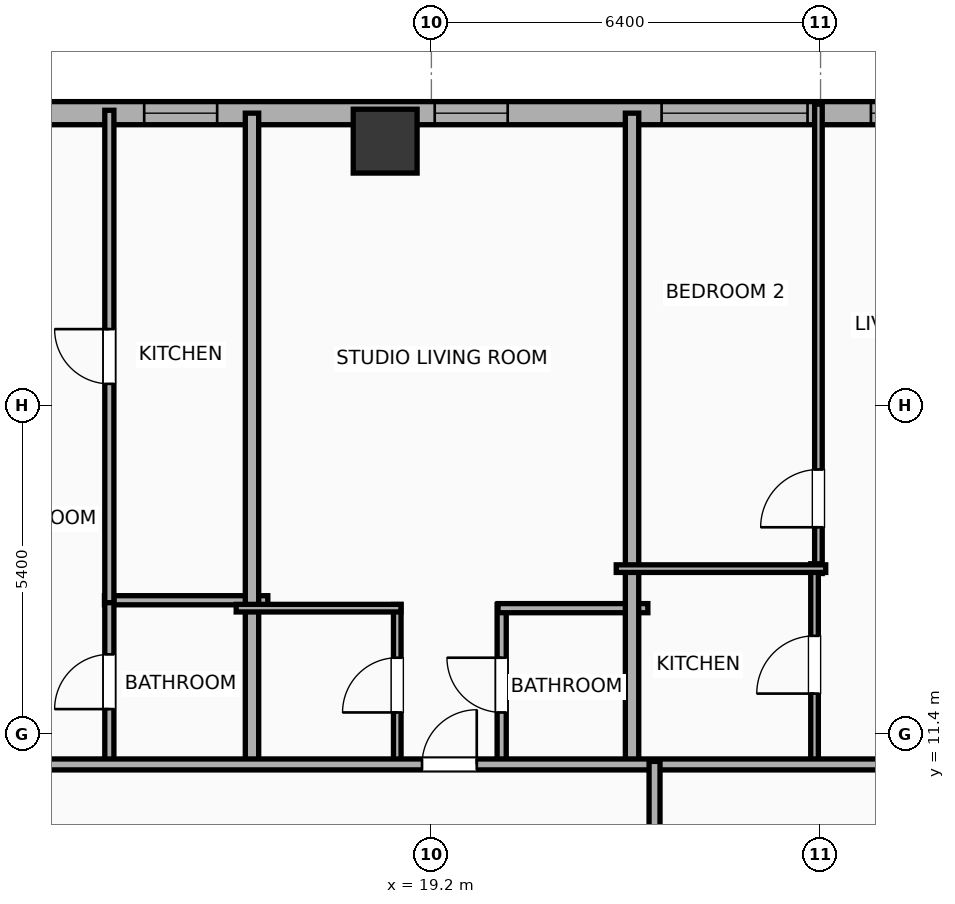
"""IFC4 building model, lengths in metres.
Left out: names, types, materials, properties, quantities, classifications, styles, units other than length and angle.
Written with IfcOpenShell. Run it as: python <this file> out.ifc"""

import sys

from ifc_helpers import new_model, si_unit, direction, frame, frame_2d, origin, origin_2d, place, context, subcontext, project, spatial, rectangle, hollow_rectangle, extrude, element, fill, save


model = new_model("IFC4")
c1 = context("Model", 3, precision=1e-05, world=origin(), true_north=direction((0.0, 1.0)))
c2 = subcontext(c1, "Body", "Model", "MODEL_VIEW")
j1 = project(units=[si_unit("LENGTHUNIT", "METRE"), si_unit("PLANEANGLEUNIT", "RADIAN")], contexts=[c1])
p1 = place(None, origin())
s1 = spatial("IfcSite", under=j1, at=p1, CompositionType="ELEMENT")
p2 = place(p1, origin())
s2 = spatial("IfcBuilding", under=s1, at=p2, CompositionType="ELEMENT")
p3 = place(p2, frame((0.0, 0.0, 89.7)))
s3 = spatial("IfcBuildingStorey", under=s2, at=p3, CompositionType="ELEMENT", Elevation=89.7)
p4 = place(p3, frame((18.44, 21.15, 0.0), z_axis=(0.0, 0.0, 1.0), x_axis=(1.0, 0.0, 0.0)))
e1 = element("IfcColumn", 1, at=p4, inside=s3, PredefinedType="COLUMN", context=c2, shape_type="SweptSolid", body=[
    extrude(hollow_rectangle(XDim=1.05, YDim=1.05, WallThickness=0.036, at=origin_2d()), origin(), (0.0, 0.0, 1.0), 3.9),
])
p5 = place(p3, frame((-25.381, 21.61, 0.0), z_axis=(0.0, 0.0, 1.0), x_axis=(1.0, 0.0, 0.0)))
e2 = element("IfcWall", 2, at=p5, inside=s3, PredefinedType="ELEMENTEDWALL", context=c2, shape_type="SweptSolid", body=[
    extrude(rectangle(XDim=54.763, YDim=0.38, at=frame_2d((27.381, 0.0))), origin(), (0.0, 0.0, 1.0), 2.54),
])
p6 = place(p5, frame((6.495, 0.0, 0.75)))
e3 = element("IfcOpeningElement", 3, at=p6, cuts=e2, PredefinedType="OPENING", context=c2, shape_type="SweptSolid", body=[
    extrude(rectangle(XDim=2.4, YDim=1.63, at=frame_2d((1.2, 0.815))), frame((0.0, 0.2, 0.0), z_axis=(0.0, -1.0, 0.0), x_axis=(1.0, 0.0, 0.0)), (0.0, 0.0, 1.0), 0.4),
])
p7 = place(p5, frame((48.367, 0.0, 0.75)))
e4 = element("IfcOpeningElement", 4, at=p7, cuts=e2, PredefinedType="OPENING", context=c2, shape_type="SweptSolid", body=[
    extrude(rectangle(XDim=2.4, YDim=1.63, at=frame_2d((1.2, 0.815))), frame((0.0, 0.2, 0.0), z_axis=(0.0, -1.0, 0.0), x_axis=(1.0, 0.0, 0.0)), (0.0, 0.0, 1.0), 0.4),
])
p8 = place(p5, frame((1.231, 0.0, 0.75)))
e5 = element("IfcOpeningElement", 5, at=p8, cuts=e2, PredefinedType="OPENING", context=c2, shape_type="SweptSolid", body=[
    extrude(rectangle(XDim=1.2, YDim=1.63, at=frame_2d((0.6, 0.815))), frame((0.0, 0.2, 0.0), z_axis=(0.0, -1.0, 0.0), x_axis=(1.0, 0.0, 0.0)), (0.0, 0.0, 1.0), 0.4),
])
p9 = place(p5, frame((3.772, 0.0, 0.75)))
e6 = element("IfcOpeningElement", 6, at=p9, cuts=e2, PredefinedType="OPENING", context=c2, shape_type="SweptSolid", body=[
    extrude(rectangle(XDim=1.2, YDim=1.63, at=frame_2d((0.6, 0.815))), frame((0.0, 0.2, 0.0), z_axis=(0.0, -1.0, 0.0), x_axis=(1.0, 0.0, 0.0)), (0.0, 0.0, 1.0), 0.4),
])
p10 = place(p5, frame((12.031, 0.0, 0.75)))
e7 = element("IfcOpeningElement", 7, at=p10, cuts=e2, PredefinedType="OPENING", context=c2, shape_type="SweptSolid", body=[
    extrude(rectangle(XDim=1.2, YDim=1.63, at=frame_2d((0.6, 0.815))), frame((0.0, 0.2, 0.0), z_axis=(0.0, -1.0, 0.0), x_axis=(1.0, 0.0, 0.0)), (0.0, 0.0, 1.0), 0.4),
])
p11 = place(p5, frame((19.805, 0.0, 0.75)))
e8 = element("IfcOpeningElement", 8, at=p11, cuts=e2, PredefinedType="OPENING", context=c2, shape_type="SweptSolid", body=[
    extrude(rectangle(XDim=1.2, YDim=1.63, at=frame_2d((0.6, 0.815))), frame((0.0, 0.2, 0.0), z_axis=(0.0, -1.0, 0.0), x_axis=(1.0, 0.0, 0.0)), (0.0, 0.0, 1.0), 0.4),
])
p12 = place(p5, frame((16.555, 0.0, 0.75)))
e9 = element("IfcOpeningElement", 9, at=p12, cuts=e2, PredefinedType="OPENING", context=c2, shape_type="SweptSolid", body=[
    extrude(rectangle(XDim=1.2, YDim=1.63, at=frame_2d((0.6, 0.815))), frame((0.0, 0.2, 0.0), z_axis=(0.0, -1.0, 0.0), x_axis=(1.0, 0.0, 0.0)), (0.0, 0.0, 1.0), 0.4),
])
p13 = place(p5, frame((23.866, 0.0, 0.75)))
e10 = element("IfcOpeningElement", 10, at=p13, cuts=e2, PredefinedType="OPENING", context=c2, shape_type="SweptSolid", body=[
    extrude(rectangle(XDim=1.2, YDim=1.63, at=frame_2d((0.6, 0.815))), frame((0.0, 0.2, 0.0), z_axis=(0.0, -1.0, 0.0), x_axis=(1.0, 0.0, 0.0)), (0.0, 0.0, 1.0), 0.4),
])
p14 = place(p5, frame((27.116, 0.0, 0.75)))
e11 = element("IfcOpeningElement", 11, at=p14, cuts=e2, PredefinedType="OPENING", context=c2, shape_type="SweptSolid", body=[
    extrude(rectangle(XDim=1.2, YDim=1.63, at=frame_2d((0.6, 0.815))), frame((0.0, 0.2, 0.0), z_axis=(0.0, -1.0, 0.0), x_axis=(1.0, 0.0, 0.0)), (0.0, 0.0, 1.0), 0.4),
])
p15 = place(p5, frame((30.931, 0.0, 0.75)))
e12 = element("IfcOpeningElement", 12, at=p15, cuts=e2, PredefinedType="OPENING", context=c2, shape_type="SweptSolid", body=[
    extrude(rectangle(XDim=1.2, YDim=1.63, at=frame_2d((0.6, 0.815))), frame((0.0, 0.2, 0.0), z_axis=(0.0, -1.0, 0.0), x_axis=(1.0, 0.0, 0.0)), (0.0, 0.0, 1.0), 0.4),
])
p16 = place(p5, frame((36.733, 0.0, 0.75)))
e13 = element("IfcOpeningElement", 13, at=p16, cuts=e2, PredefinedType="OPENING", context=c2, shape_type="SweptSolid", body=[
    extrude(rectangle(XDim=1.2, YDim=1.63, at=frame_2d((0.6, 0.815))), frame((0.0, 0.2, 0.0), z_axis=(0.0, -1.0, 0.0), x_axis=(1.0, 0.0, 0.0)), (0.0, 0.0, 1.0), 0.4),
])
p17 = place(p5, frame((39.858, 0.0, 0.75)))
e14 = element("IfcOpeningElement", 14, at=p17, cuts=e2, PredefinedType="OPENING", context=c2, shape_type="SweptSolid", body=[
    extrude(rectangle(XDim=1.2, YDim=1.63, at=frame_2d((0.6, 0.815))), frame((0.0, 0.2, 0.0), z_axis=(0.0, -1.0, 0.0), x_axis=(1.0, 0.0, 0.0)), (0.0, 0.0, 1.0), 0.4),
])
p18 = place(p5, frame((44.636, 0.0, 0.75)))
e15 = element("IfcOpeningElement", 15, at=p18, cuts=e2, PredefinedType="OPENING", context=c2, shape_type="SweptSolid", body=[
    extrude(rectangle(XDim=1.2, YDim=1.63, at=frame_2d((0.6, 0.815))), frame((0.0, 0.2, 0.0), z_axis=(0.0, -1.0, 0.0), x_axis=(1.0, 0.0, 0.0)), (0.0, 0.0, 1.0), 0.4),
])
p19 = place(p5, frame((51.809, 0.0, 0.75)))
e16 = element("IfcOpeningElement", 16, at=p19, cuts=e2, PredefinedType="OPENING", context=c2, shape_type="SweptSolid", body=[
    extrude(rectangle(XDim=1.2, YDim=1.63, at=frame_2d((0.6, 0.815))), frame((0.0, 0.2, 0.0), z_axis=(0.0, -1.0, 0.0), x_axis=(1.0, 0.0, 0.0)), (0.0, 0.0, 1.0), 0.4),
])
p20 = place(p3, frame((13.824, 13.6, 0.0), z_axis=(0.0, 0.0, 1.0), x_axis=(1.0, 0.0, 0.0)))
e17 = element("IfcWall", 17, at=p20, inside=s3, PredefinedType="PLUMBINGWALL", context=c2, shape_type="SweptSolid", body=[
    extrude(rectangle(XDim=2.686, YDim=0.15, at=frame_2d((1.343, 0.0))), origin(), (0.0, 0.0, 1.0), 3.65),
])
p21 = place(p3, frame((13.904, 10.88, 0.0), z_axis=(0.0, 0.0, 1.0), x_axis=(0.0, 1.0, 0.0)))
e18 = element("IfcWall", 18, at=p21, inside=s3, PredefinedType="PLUMBINGWALL", context=c2, shape_type="SweptSolid", body=[
    extrude(rectangle(XDim=2.76, YDim=0.15, at=frame_2d((1.38, 0.0))), origin(), (0.0, 0.0, 1.0), 3.65),
])
p22 = place(p21, frame((0.93, 0.0, 0.0)))
e19 = element("IfcOpeningElement", 19, at=p22, cuts=e18, PredefinedType="OPENING", context=c2, shape_type="SweptSolid", body=[
    extrude(rectangle(XDim=0.9, YDim=2.05, at=frame_2d((0.45, 1.025))), frame((0.0, 0.085, 0.0), z_axis=(0.0, -1.0, 0.0), x_axis=(1.0, 0.0, 0.0)), (0.0, 0.0, 1.0), 0.17),
])
p23 = place(p3, frame((13.904, 13.56, 0.0), z_axis=(0.0, 0.0, 1.0), x_axis=(0.0, 1.0, 0.0)))
e20 = element("IfcWall", 20, at=p23, inside=s3, PredefinedType="PLUMBINGWALL", context=c2, shape_type="SweptSolid", body=[
    extrude(rectangle(XDim=8.098, YDim=0.15, at=frame_2d((4.049, 0.0))), origin(), (0.0, 0.0, 1.0), 3.65),
])
p24 = place(p23, frame((3.599, 0.0, 0.0)))
e21 = element("IfcOpeningElement", 21, at=p24, cuts=e20, PredefinedType="OPENING", context=c2, shape_type="SweptSolid", body=[
    extrude(rectangle(XDim=0.9, YDim=2.05, at=frame_2d((0.45, 1.025))), frame((0.0, 0.085, 0.0), z_axis=(0.0, -1.0, 0.0), x_axis=(1.0, 0.0, 0.0)), (0.0, 0.0, 1.0), 0.17),
])
p25 = place(p3, frame((16.25, 10.82, 0.0), z_axis=(0.0, 0.0, 1.0), x_axis=(0.0, 1.0, 0.0)))
e22 = element("IfcWall", 22, at=p25, inside=s3, PredefinedType="PARTITIONING", context=c2, shape_type="SweptSolid", body=[
    extrude(rectangle(XDim=10.79, YDim=0.22, at=frame_2d((5.395, 0.0))), origin(), (0.0, 0.0, 1.0), 3.65),
])
p26 = place(p3, frame((18.639, 10.88, 0.0), z_axis=(0.0, 0.0, 1.0), x_axis=(0.0, 1.0, 0.0)))
e23 = element("IfcWall", 23, at=p26, inside=s3, PredefinedType="PARTITIONING", context=c2, shape_type="SweptSolid", body=[
    extrude(rectangle(XDim=2.65, YDim=0.125, at=frame_2d((1.325, 0.0))), origin(), (0.0, 0.0, 1.0), 2.54),
])
p27 = place(p26, frame((0.875, 0.0, 0.0)))
e24 = element("IfcOpeningElement", 24, at=p27, cuts=e23, PredefinedType="OPENING", context=c2, shape_type="SweptSolid", body=[
    extrude(rectangle(XDim=0.9, YDim=2.05, at=frame_2d((0.45, 1.025))), frame((0.0, 0.073, 0.0), z_axis=(0.0, -1.0, 0.0), x_axis=(1.0, 0.0, 0.0)), (0.0, 0.0, 1.0), 0.145),
])
p28 = place(p3, frame((20.356, 10.88, 0.0), z_axis=(0.0, 0.0, 1.0), x_axis=(0.0, 1.0, 0.0)))
e25 = element("IfcWall", 25, at=p28, inside=s3, PredefinedType="PLUMBINGWALL", context=c2, shape_type="SweptSolid", body=[
    extrude(rectangle(XDim=2.65, YDim=0.15, at=frame_2d((1.325, 0.0))), origin(), (0.0, 0.0, 1.0), 3.65),
])
p29 = place(p28, frame((0.875, 0.0, 0.0)))
e26 = element("IfcOpeningElement", 26, at=p29, cuts=e25, PredefinedType="OPENING", context=c2, shape_type="SweptSolid", body=[
    extrude(rectangle(XDim=0.9, YDim=2.05, at=frame_2d((0.45, 1.025))), frame((0.0, 0.085, 0.0), z_axis=(0.0, -1.0, 0.0), x_axis=(1.0, 0.0, 0.0)), (0.0, 0.0, 1.0), 0.17),
])
p30 = place(p3, frame((15.99, 13.47, 0.0), z_axis=(0.0, 0.0, 1.0), x_axis=(1.0, 0.0, 0.0)))
e27 = element("IfcWall", 27, at=p30, inside=s3, PredefinedType="PARTITIONING", context=c2, shape_type="SweptSolid", body=[
    extrude(rectangle(XDim=2.709, YDim=0.125, at=frame_2d((1.354, 0.0))), origin(), (0.0, 0.0, 1.0), 3.65),
])
p31 = place(p3, frame((20.296, 13.47, 0.0), z_axis=(0.0, 0.0, 1.0), x_axis=(1.0, 0.0, 0.0)))
e28 = element("IfcWall", 28, at=p31, inside=s3, PredefinedType="PLUMBINGWALL", context=c2, shape_type="SweptSolid", body=[
    extrude(rectangle(XDim=2.464, YDim=0.15, at=frame_2d((1.232, 0.0))), origin(), (0.0, 0.0, 1.0), 3.65),
])
p32 = place(p3, frame((22.5, 10.82, 0.0), z_axis=(0.0, 0.0, 1.0), x_axis=(0.0, 1.0, 0.0)))
e29 = element("IfcWall", 29, at=p32, inside=s3, PredefinedType="PARTITIONING", context=c2, shape_type="SweptSolid", body=[
    extrude(rectangle(XDim=10.79, YDim=0.22, at=frame_2d((5.395, 0.0))), origin(), (0.0, 0.0, 1.0), 3.65),
])
p33 = place(p3, frame((25.565, 14.04, 0.0), z_axis=(0.0, 0.0, 1.0), x_axis=(0.0, 1.0, 0.0)))
e30 = element("IfcWall", 30, at=p33, inside=s3, PredefinedType="PARTITIONING", context=c2, shape_type="SweptSolid", body=[
    extrude(rectangle(XDim=7.72, YDim=0.125, at=frame_2d((3.86, 0.0))), origin(), (0.0, 0.0, 1.0), 3.65),
])
p34 = place(p33, frame((0.76, 0.0, 0.0)))
e31 = element("IfcOpeningElement", 31, at=p34, cuts=e30, PredefinedType="OPENING", context=c2, shape_type="SweptSolid", body=[
    extrude(rectangle(XDim=0.95, YDim=2.05, at=frame_2d((0.475, 1.025))), frame((0.0, 0.073, 0.0), z_axis=(0.0, -1.0, 0.0), x_axis=(1.0, 0.0, 0.0)), (0.0, 0.0, 1.0), 0.145),
])
p35 = place(p3, frame((25.501, 10.88, 0.0), z_axis=(0.0, 0.0, 1.0), x_axis=(0.0, 1.0, 0.0)))
e32 = element("IfcWall", 32, at=p35, inside=s3, PredefinedType="PARTITIONING", context=c2, shape_type="SweptSolid", body=[
    extrude(rectangle(XDim=3.32, YDim=0.125, at=frame_2d((1.66, 0.0))), origin(), (0.0, 0.0, 1.0), 3.65),
])
p36 = place(p35, frame((1.185, 0.0, 0.0)))
e33 = element("IfcOpeningElement", 33, at=p36, cuts=e32, PredefinedType="OPENING", context=c2, shape_type="SweptSolid", body=[
    extrude(rectangle(XDim=0.95, YDim=2.05, at=frame_2d((0.475, 1.025))), frame((0.0, 0.073, 0.0), z_axis=(0.0, -1.0, 0.0), x_axis=(1.0, 0.0, 0.0)), (0.0, 0.0, 1.0), 0.145),
])
p37 = place(p3, frame((22.24, 14.12, 0.0), z_axis=(0.0, 0.0, 1.0), x_axis=(1.0, 0.0, 0.0)))
e34 = element("IfcWall", 34, at=p37, inside=s3, PredefinedType="PARTITIONING", context=c2, shape_type="SweptSolid", body=[
    extrude(rectangle(XDim=3.445, YDim=0.125, at=frame_2d((1.723, 0.0))), origin(), (0.0, 0.0, 1.0), 3.65),
])
p38 = place(p3, frame((-29.21, 10.9, 0.0), z_axis=(0.0, 0.0, 1.0), x_axis=(1.0, 0.0, 0.0)))
e35 = element("IfcWall", 35, at=p38, inside=s3, PredefinedType="PARTITIONING", context=c2, shape_type="SweptSolid", body=[
    extrude(rectangle(XDim=62.42, YDim=0.18, at=frame_2d((31.21, 0.0))), origin(), (0.0, 0.0, 1.0), 3.65),
])
p39 = place(p38, frame((2.983, 0.0, 0.0)))
e36 = element("IfcOpeningElement", 36, at=p39, cuts=e35, PredefinedType="OPENING", context=c2, shape_type="SweptSolid", body=[
    extrude(rectangle(XDim=0.9, YDim=2.05, at=frame_2d((0.45, 1.025))), frame((0.0, 0.1, 0.0), z_axis=(0.0, -1.0, 0.0), x_axis=(1.0, 0.0, 0.0)), (0.0, 0.0, 1.0), 0.2),
])
p40 = place(p38, frame((9.618, 0.0, 0.0)))
e37 = element("IfcOpeningElement", 37, at=p40, cuts=e35, PredefinedType="OPENING", context=c2, shape_type="SweptSolid", body=[
    extrude(rectangle(XDim=0.9, YDim=2.05, at=frame_2d((0.45, 1.025))), frame((0.0, 0.1, 0.0), z_axis=(0.0, -1.0, 0.0), x_axis=(1.0, 0.0, 0.0)), (0.0, 0.0, 1.0), 0.2),
])
p41 = place(p38, frame((16.135, 0.0, 0.0)))
e38 = element("IfcOpeningElement", 38, at=p41, cuts=e35, PredefinedType="OPENING", context=c2, shape_type="SweptSolid", body=[
    extrude(rectangle(XDim=0.9, YDim=2.05, at=frame_2d((0.45, 1.025))), frame((0.0, 0.1, 0.0), z_axis=(0.0, -1.0, 0.0), x_axis=(1.0, 0.0, 0.0)), (0.0, 0.0, 1.0), 0.2),
])
p42 = place(p38, frame((23.632, 0.0, 0.0)))
e39 = element("IfcOpeningElement", 39, at=p42, cuts=e35, PredefinedType="OPENING", context=c2, shape_type="SweptSolid", body=[
    extrude(rectangle(XDim=1.15, YDim=2.05, at=frame_2d((0.575, 1.025))), frame((0.0, 0.1, 0.0), z_axis=(0.0, -1.0, 0.0), x_axis=(1.0, 0.0, 0.0)), (0.0, 0.0, 1.0), 0.2),
])
p43 = place(p38, frame((27.751, 0.0, 0.0)))
e40 = element("IfcOpeningElement", 40, at=p43, cuts=e35, PredefinedType="OPENING", context=c2, shape_type="SweptSolid", body=[
    extrude(rectangle(XDim=1.15, YDim=2.05, at=frame_2d((0.575, 1.025))), frame((0.0, 0.1, 0.0), z_axis=(0.0, -1.0, 0.0), x_axis=(1.0, 0.0, 0.0)), (0.0, 0.0, 1.0), 0.2),
])
p44 = place(p38, frame((35.635, 0.0, 0.0)))
e41 = element("IfcOpeningElement", 41, at=p44, cuts=e35, PredefinedType="OPENING", context=c2, shape_type="SweptSolid", body=[
    extrude(rectangle(XDim=0.9, YDim=2.05, at=frame_2d((0.45, 1.025))), frame((0.0, 0.1, 0.0), z_axis=(0.0, -1.0, 0.0), x_axis=(1.0, 0.0, 0.0)), (0.0, 0.0, 1.0), 0.2),
])
p45 = place(p38, frame((40.616, 0.0, 0.0)))
e42 = element("IfcOpeningElement", 42, at=p45, cuts=e35, PredefinedType="OPENING", context=c2, shape_type="SweptSolid", body=[
    extrude(rectangle(XDim=1.15, YDim=2.05, at=frame_2d((0.575, 1.025))), frame((0.0, 0.1, 0.0), z_axis=(0.0, -1.0, 0.0), x_axis=(1.0, 0.0, 0.0)), (0.0, 0.0, 1.0), 0.2),
])
p46 = place(p38, frame((48.256, 0.0, 0.0)))
e43 = element("IfcOpeningElement", 43, at=p46, cuts=e35, PredefinedType="OPENING", context=c2, shape_type="SweptSolid", body=[
    extrude(rectangle(XDim=0.9, YDim=2.05, at=frame_2d((0.45, 1.025))), frame((0.0, 0.1, 0.0), z_axis=(0.0, -1.0, 0.0), x_axis=(1.0, 0.0, 0.0)), (0.0, 0.0, 1.0), 0.2),
])
p47 = place(p38, frame((57.032, 0.0, 0.0)))
e44 = element("IfcOpeningElement", 44, at=p47, cuts=e35, PredefinedType="OPENING", context=c2, shape_type="SweptSolid", body=[
    extrude(rectangle(XDim=1.15, YDim=2.05, at=frame_2d((0.575, 1.025))), frame((0.0, 0.1, 0.0), z_axis=(0.0, -1.0, 0.0), x_axis=(1.0, 0.0, 0.0)), (0.0, 0.0, 1.0), 0.2),
])
p48 = place(p3, frame((22.87, -10.95, 0.0), z_axis=(0.0, 0.0, 1.0), x_axis=(0.0, 1.0, 0.0)))
e45 = element("IfcWall", 45, at=p48, inside=s3, PredefinedType="PARTITIONING", context=c2, shape_type="SweptSolid", body=[
    extrude(rectangle(XDim=21.9, YDim=0.18, at=frame_2d((10.95, 0.0))), origin(), (0.0, 0.0, 1.0), 3.65),
])
p49 = place(p48, frame((19.015, 0.0, 0.0)))
e46 = element("IfcOpeningElement", 46, at=p49, cuts=e45, PredefinedType="OPENING", context=c2, shape_type="SweptSolid", body=[
    extrude(rectangle(XDim=0.95, YDim=2.05, at=frame_2d((0.475, 1.025))), frame((0.0, 0.1, 0.0), z_axis=(0.0, -1.0, 0.0), x_axis=(1.0, 0.0, 0.0)), (0.0, 0.0, 1.0), 0.2),
])
p50 = place(p7, origin())
e47 = element("IfcWindow", 47, at=p50, inside=s3, PartitioningType="SINGLE_PANEL", PredefinedType="WINDOW", context=c2, shape_type="SweptSolid", body=[
    extrude(rectangle(XDim=2.4, YDim=1.63, at=frame_2d((1.2, 0.815))), frame((0.0, 0.03, 0.0), z_axis=(0.0, -1.0, 0.0), x_axis=(1.0, 0.0, 0.0)), (0.0, 0.0, 1.0), 0.06),
])
fill(e4, e47)
p51 = place(p17, origin())
e48 = element("IfcWindow", 48, at=p51, inside=s3, PartitioningType="SINGLE_PANEL", PredefinedType="WINDOW", context=c2, shape_type="SweptSolid", body=[
    extrude(rectangle(XDim=1.2, YDim=1.63, at=frame_2d((0.6, 0.815))), frame((0.0, 0.03, 0.0), z_axis=(0.0, -1.0, 0.0), x_axis=(1.0, 0.0, 0.0)), (0.0, 0.0, 1.0), 0.06),
])
fill(e14, e48)
p52 = place(p18, origin())
e49 = element("IfcWindow", 49, at=p52, inside=s3, PartitioningType="SINGLE_PANEL", PredefinedType="WINDOW", context=c2, shape_type="SweptSolid", body=[
    extrude(rectangle(XDim=1.2, YDim=1.63, at=frame_2d((0.6, 0.815))), frame((0.0, 0.03, 0.0), z_axis=(0.0, -1.0, 0.0), x_axis=(1.0, 0.0, 0.0)), (0.0, 0.0, 1.0), 0.06),
])
fill(e15, e49)
p53 = place(p19, origin())
e50 = element("IfcWindow", 50, at=p53, inside=s3, PartitioningType="SINGLE_PANEL", PredefinedType="WINDOW", context=c2, shape_type="SweptSolid", body=[
    extrude(rectangle(XDim=1.2, YDim=1.63, at=frame_2d((0.6, 0.815))), frame((0.0, 0.03, 0.0), z_axis=(0.0, -1.0, 0.0), x_axis=(1.0, 0.0, 0.0)), (0.0, 0.0, 1.0), 0.06),
])
fill(e16, e50)
p54 = place(p22, origin())
e51 = element("IfcDoor", 51, at=p54, inside=s3, OperationType="SINGLE_SWING_LEFT", PredefinedType="DOOR", context=c2, shape_type="SweptSolid", body=[
    extrude(rectangle(XDim=0.9, YDim=2.05, at=frame_2d((0.45, 1.025))), frame((0.0, 0.025, 0.0), z_axis=(0.0, -1.0, 0.0), x_axis=(1.0, 0.0, 0.0)), (0.0, 0.0, 1.0), 0.05),
])
fill(e19, e51)
p55 = place(p24, origin())
e52 = element("IfcDoor", 52, at=p55, inside=s3, OperationType="SINGLE_SWING_RIGHT", PredefinedType="DOOR", context=c2, shape_type="SweptSolid", body=[
    extrude(rectangle(XDim=0.9, YDim=2.05, at=frame_2d((0.45, 1.025))), frame((0.0, 0.025, 0.0), z_axis=(0.0, -1.0, 0.0), x_axis=(1.0, 0.0, 0.0)), (0.0, 0.0, 1.0), 0.05),
])
fill(e21, e52)
p56 = place(p27, origin())
e53 = element("IfcDoor", 53, at=p56, inside=s3, OperationType="SINGLE_SWING_LEFT", PredefinedType="DOOR", context=c2, shape_type="SweptSolid", body=[
    extrude(rectangle(XDim=0.9, YDim=2.05, at=frame_2d((0.45, 1.025))), frame((0.0, 0.025, 0.0), z_axis=(0.0, -1.0, 0.0), x_axis=(1.0, 0.0, 0.0)), (0.0, 0.0, 1.0), 0.05),
])
fill(e24, e53)
p57 = place(p29, origin())
e54 = element("IfcDoor", 54, at=p57, inside=s3, OperationType="SINGLE_SWING_RIGHT", PredefinedType="DOOR", context=c2, shape_type="SweptSolid", body=[
    extrude(rectangle(XDim=0.9, YDim=2.05, at=frame_2d((0.45, 1.025))), frame((0.0, 0.025, 0.0), z_axis=(0.0, -1.0, 0.0), x_axis=(1.0, 0.0, 0.0)), (0.0, 0.0, 1.0), 0.05),
])
fill(e26, e54)
p58 = place(p34, origin())
e55 = element("IfcDoor", 55, at=p58, inside=s3, OperationType="SINGLE_SWING_LEFT", PredefinedType="DOOR", context=c2, shape_type="SweptSolid", body=[
    extrude(rectangle(XDim=0.95, YDim=2.05, at=frame_2d((0.475, 1.025))), frame((0.0, 0.025, 0.0), z_axis=(0.0, -1.0, 0.0), x_axis=(1.0, 0.0, 0.0)), (0.0, 0.0, 1.0), 0.05),
])
fill(e31, e55)
p59 = place(p36, origin())
e56 = element("IfcDoor", 56, at=p59, inside=s3, OperationType="SINGLE_SWING_LEFT", PredefinedType="DOOR", context=c2, shape_type="SweptSolid", body=[
    extrude(rectangle(XDim=0.95, YDim=2.05, at=frame_2d((0.475, 1.025))), frame((0.0, 0.025, 0.0), z_axis=(0.0, -1.0, 0.0), x_axis=(1.0, 0.0, 0.0)), (0.0, 0.0, 1.0), 0.05),
])
fill(e33, e56)
p60 = place(p46, origin())
e57 = element("IfcDoor", 57, at=p60, inside=s3, OperationType="SINGLE_SWING_RIGHT", PredefinedType="DOOR", context=c2, shape_type="SweptSolid", body=[
    extrude(rectangle(XDim=0.9, YDim=2.05, at=frame_2d((0.45, 1.025))), frame((0.0, 0.025, 0.0), z_axis=(0.0, -1.0, 0.0), x_axis=(1.0, 0.0, 0.0)), (0.0, 0.0, 1.0), 0.05),
])
fill(e43, e57)
save(model, sys.argv[1])
